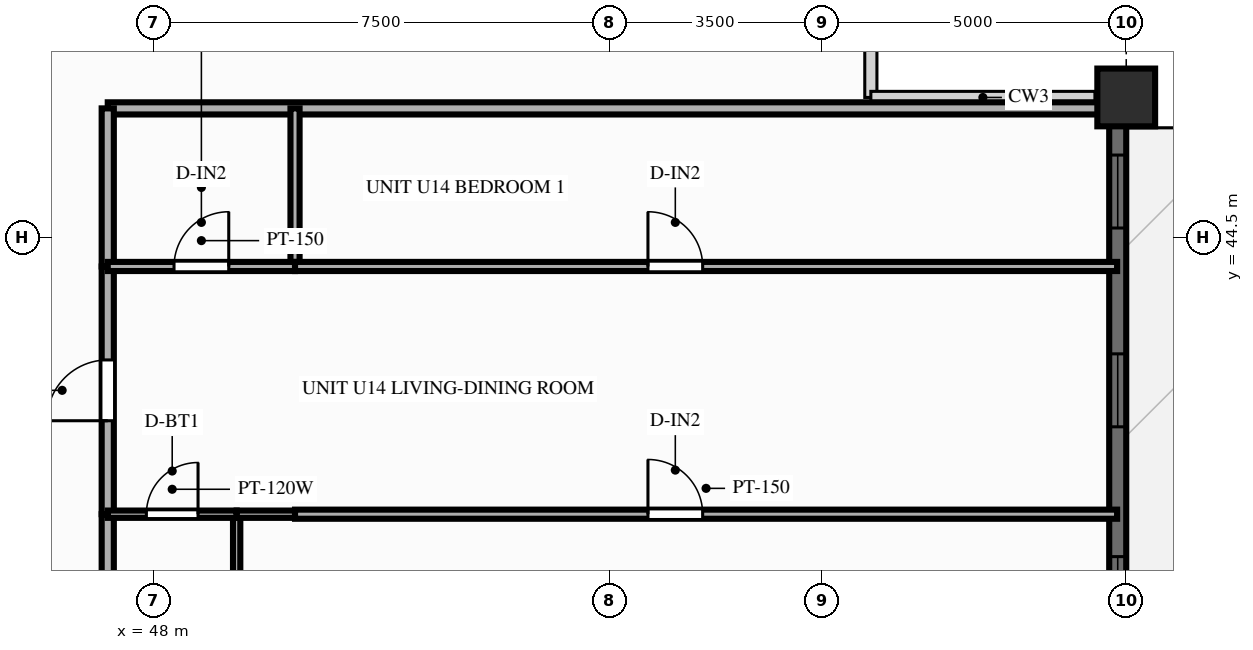
"""IFC4 building model, lengths in metres.
Left out: names, types, materials, properties, quantities, classifications, styles, units other than length and angle.
Written with IfcOpenShell. Run it as: python <this file> out.ifc"""

import sys

from ifc_helpers import new_model, si_unit, direction, frame, frame_2d, origin, origin_2d, place, context, subcontext, project, spatial, rectangle, extrude, source, transform, mapped, element, fill, save


model = new_model("IFC4")
c1 = context("Model", 3, precision=1e-05, world=origin(), true_north=direction((0.0, 1.0)))
c2 = subcontext(c1, "Body", "Model", "MODEL_VIEW")
j1 = project(units=[si_unit("LENGTHUNIT", "METRE"), si_unit("PLANEANGLEUNIT", "RADIAN")], contexts=[c1])
p1 = place(None, origin())
s1 = spatial("IfcSite", under=j1, at=p1, CompositionType="ELEMENT")
p2 = place(p1, origin())
s2 = spatial("IfcBuilding", under=s1, at=p2, CompositionType="ELEMENT")
p3 = place(p2, frame((0.0, 0.0, 116.85)))
s3 = spatial("IfcBuildingStorey", under=s2, at=p3, CompositionType="ELEMENT", Elevation=116.85)
m1 = source(origin(), c2, "Body", "SweptSolid", [
    extrude(rectangle(XDim=0.95, YDim=0.95, at=origin_2d()), origin(), (0.0, 0.0, 1.0), 3.0),
])
p4 = place(p3, frame((64.0, 46.8, 0.0), z_axis=(0.0, 0.0, 1.0), x_axis=(1.0, 0.0, 0.0)))
e1 = element("IfcColumn", 1, at=p4, inside=s3, PredefinedType="COLUMN", context=c2, shape_type="MappedRepresentation", body=[
    mapped(m1, transform((0.0, 0.0, 0.0), scale=1.0)),
])
p5 = place(p3, frame((63.86, 7.2, 0.0), z_axis=(0.0, 0.0, 1.0), x_axis=(0.0, 1.0, 0.0)))
e2 = element("IfcWall", 2, at=p5, inside=s3, PredefinedType="SOLIDWALL", context=c2, shape_type="SweptSolid", body=[
    extrude(rectangle(XDim=39.6, YDim=0.28, at=frame_2d((19.8, 0.0))), origin(), (0.0, 0.0, 1.0), 2.28),
])
p6 = place(p5, frame((1.56, 0.0, 0.25)))
e3 = element("IfcOpeningElement", 3, at=p6, cuts=e2, PredefinedType="OPENING", context=c2, shape_type="SweptSolid", body=[
    extrude(rectangle(XDim=1.2, YDim=1.5, at=frame_2d((0.6, 0.75))), frame((0.0, 0.152, 0.0), z_axis=(0.0, -1.0, 0.0), x_axis=(1.0, 0.0, 0.0)), (0.0, 0.0, 1.0), 0.304),
])
p7 = place(p5, frame((4.829, 0.0, 0.25)))
e4 = element("IfcOpeningElement", 4, at=p7, cuts=e2, PredefinedType="OPENING", context=c2, shape_type="SweptSolid", body=[
    extrude(rectangle(XDim=1.2, YDim=1.5, at=frame_2d((0.6, 0.75))), frame((0.0, 0.152, 0.0), z_axis=(0.0, -1.0, 0.0), x_axis=(1.0, 0.0, 0.0)), (0.0, 0.0, 1.0), 0.304),
])
p8 = place(p5, frame((7.567, 0.0, 0.25)))
e5 = element("IfcOpeningElement", 5, at=p8, cuts=e2, PredefinedType="OPENING", context=c2, shape_type="SweptSolid", body=[
    extrude(rectangle(XDim=1.2, YDim=1.5, at=frame_2d((0.6, 0.75))), frame((0.0, 0.152, 0.0), z_axis=(0.0, -1.0, 0.0), x_axis=(1.0, 0.0, 0.0)), (0.0, 0.0, 1.0), 0.304),
])
p9 = place(p5, frame((11.476, 0.0, 0.25)))
e6 = element("IfcOpeningElement", 6, at=p9, cuts=e2, PredefinedType="OPENING", context=c2, shape_type="SweptSolid", body=[
    extrude(rectangle(XDim=0.95, YDim=1.5, at=frame_2d((0.475, 0.75))), frame((0.0, 0.152, 0.0), z_axis=(0.0, -1.0, 0.0), x_axis=(1.0, 0.0, 0.0)), (0.0, 0.0, 1.0), 0.304),
])
p10 = place(p5, frame((13.552, 0.0, 0.25)))
e7 = element("IfcOpeningElement", 7, at=p10, cuts=e2, PredefinedType="OPENING", context=c2, shape_type="SweptSolid", body=[
    extrude(rectangle(XDim=1.2, YDim=1.5, at=frame_2d((0.6, 0.75))), frame((0.0, 0.152, 0.0), z_axis=(0.0, -1.0, 0.0), x_axis=(1.0, 0.0, 0.0)), (0.0, 0.0, 1.0), 0.304),
])
p11 = place(p5, frame((16.518, 0.0, 0.25)))
e8 = element("IfcOpeningElement", 8, at=p11, cuts=e2, PredefinedType="OPENING", context=c2, shape_type="SweptSolid", body=[
    extrude(rectangle(XDim=1.2, YDim=1.5, at=frame_2d((0.6, 0.75))), frame((0.0, 0.152, 0.0), z_axis=(0.0, -1.0, 0.0), x_axis=(1.0, 0.0, 0.0)), (0.0, 0.0, 1.0), 0.304),
])
p12 = place(p5, frame((19.2, 0.0, 0.25)))
e9 = element("IfcOpeningElement", 9, at=p12, cuts=e2, PredefinedType="OPENING", context=c2, shape_type="SweptSolid", body=[
    extrude(rectangle(XDim=1.2, YDim=1.5, at=frame_2d((0.6, 0.75))), frame((0.0, 0.152, 0.0), z_axis=(0.0, -1.0, 0.0), x_axis=(1.0, 0.0, 0.0)), (0.0, 0.0, 1.0), 0.304),
])
p13 = place(p5, frame((21.578, 0.0, 0.25)))
e10 = element("IfcOpeningElement", 10, at=p13, cuts=e2, PredefinedType="OPENING", context=c2, shape_type="SweptSolid", body=[
    extrude(rectangle(XDim=1.2, YDim=1.5, at=frame_2d((0.6, 0.75))), frame((0.0, 0.152, 0.0), z_axis=(0.0, -1.0, 0.0), x_axis=(1.0, 0.0, 0.0)), (0.0, 0.0, 1.0), 0.304),
])
p14 = place(p5, frame((26.313, 0.0, 0.0), z_axis=(0.0, 0.0, 1.0), x_axis=(-1.0, 0.0, 0.0)))
e11 = element("IfcOpeningElement", 11, at=p14, cuts=e2, PredefinedType="OPENING", context=c2, shape_type="SweptSolid", body=[
    extrude(rectangle(XDim=1.6, YDim=2.15, at=frame_2d((0.8, 1.075))), frame((0.0, 0.152, 0.0), z_axis=(0.0, -1.0, 0.0), x_axis=(1.0, 0.0, 0.0)), (0.0, 0.0, 1.0), 0.304),
])
p15 = place(p5, frame((29.305, 0.0, 0.25)))
e12 = element("IfcOpeningElement", 12, at=p15, cuts=e2, PredefinedType="OPENING", context=c2, shape_type="SweptSolid", body=[
    extrude(rectangle(XDim=0.7, YDim=1.5, at=frame_2d((0.35, 0.75))), frame((0.0, 0.152, 0.0), z_axis=(0.0, -1.0, 0.0), x_axis=(1.0, 0.0, 0.0)), (0.0, 0.0, 1.0), 0.304),
])
p16 = place(p5, frame((30.848, 0.0, 0.25)))
e13 = element("IfcOpeningElement", 13, at=p16, cuts=e2, PredefinedType="OPENING", context=c2, shape_type="SweptSolid", body=[
    extrude(rectangle(XDim=1.2, YDim=1.5, at=frame_2d((0.6, 0.75))), frame((0.0, 0.152, 0.0), z_axis=(0.0, -1.0, 0.0), x_axis=(1.0, 0.0, 0.0)), (0.0, 0.0, 1.0), 0.304),
])
p17 = place(p5, frame((34.183, 0.0, 0.25)))
e14 = element("IfcOpeningElement", 14, at=p17, cuts=e2, PredefinedType="OPENING", context=c2, shape_type="SweptSolid", body=[
    extrude(rectangle(XDim=1.2, YDim=1.5, at=frame_2d((0.6, 0.75))), frame((0.0, 0.152, 0.0), z_axis=(0.0, -1.0, 0.0), x_axis=(1.0, 0.0, 0.0)), (0.0, 0.0, 1.0), 0.304),
])
p18 = place(p5, frame((37.452, 0.0, 0.25)))
e15 = element("IfcOpeningElement", 15, at=p18, cuts=e2, PredefinedType="OPENING", context=c2, shape_type="SweptSolid", body=[
    extrude(rectangle(XDim=1.2, YDim=1.5, at=frame_2d((0.6, 0.75))), frame((0.0, 0.152, 0.0), z_axis=(0.0, -1.0, 0.0), x_axis=(1.0, 0.0, 0.0)), (0.0, 0.0, 1.0), 0.304),
])
p19 = place(p3, frame((47.25, 46.62, 0.0), z_axis=(0.0, 0.0, 1.0), x_axis=(1.0, 0.0, 0.0)))
e16 = element("IfcWall", 16, at=p19, inside=s3, PredefinedType="PARTITIONING", context=c2, shape_type="SweptSolid", body=[
    extrude(rectangle(XDim=16.6, YDim=0.2, at=frame_2d((8.3, 0.0))), origin(), (0.0, 0.0, 1.0), 2.79),
])
p20 = place(p3, frame((47.25, 37.35, 0.0), z_axis=(0.0, 0.0, 1.0), x_axis=(0.0, 1.0, 0.0)))
e17 = element("IfcWall", 17, at=p20, inside=s3, PredefinedType="PARTITIONING", context=c2, shape_type="SweptSolid", body=[
    extrude(rectangle(XDim=2.595, YDim=0.2, at=frame_2d((1.298, 0.0))), origin(), (0.0, 0.0, 1.0), 2.79),
])
p21 = place(p3, frame((47.25, 39.946, 0.0), z_axis=(0.0, 0.0, 1.0), x_axis=(0.0, 1.0, 0.0)))
e18 = element("IfcWall", 18, at=p21, inside=s3, PredefinedType="PARTITIONING", context=c2, shape_type="SweptSolid", body=[
    extrude(rectangle(XDim=4.074, YDim=0.2, at=frame_2d((2.037, 0.0))), origin(), (0.0, 0.0, 1.0), 2.79),
])
p22 = place(p21, frame((1.537, 0.0, 0.0)))
e19 = element("IfcOpeningElement", 19, at=p22, cuts=e18, PredefinedType="OPENING", context=c2, shape_type="SweptSolid", body=[
    extrude(rectangle(XDim=1.0, YDim=2.15, at=frame_2d((0.5, 1.075))), frame((0.0, 0.112, 0.0), z_axis=(0.0, -1.0, 0.0), x_axis=(1.0, 0.0, 0.0)), (0.0, 0.0, 1.0), 0.224),
])
p23 = place(p3, frame((47.25, 44.02, 0.0), z_axis=(0.0, 0.0, 1.0), x_axis=(0.0, 1.0, 0.0)))
e20 = element("IfcWall", 20, at=p23, inside=s3, PredefinedType="PARTITIONING", context=c2, shape_type="SweptSolid", body=[
    extrude(rectangle(XDim=2.6, YDim=0.2, at=frame_2d((1.3, 0.0))), origin(), (0.0, 0.0, 1.0), 2.79),
])
p24 = place(p3, frame((49.37, 37.35, 0.0), z_axis=(0.0, 0.0, 1.0), x_axis=(0.0, 1.0, 0.0)))
e21 = element("IfcWall", 21, at=p24, inside=s3, PredefinedType="PARTITIONING", context=c2, shape_type="SweptSolid", body=[
    extrude(rectangle(XDim=2.595, YDim=0.12, at=frame_2d((1.298, 0.0))), origin(), (0.0, 0.0, 1.0), 2.79),
])
p25 = place(p3, frame((50.33, 44.02, 0.0), z_axis=(0.0, 0.0, 1.0), x_axis=(0.0, 1.0, 0.0)))
e22 = element("IfcWall", 22, at=p25, inside=s3, PredefinedType="PARTITIONING", context=c2, shape_type="SweptSolid", body=[
    extrude(rectangle(XDim=2.6, YDim=0.15, at=frame_2d((1.3, 0.0))), origin(), (0.0, 0.0, 1.0), 2.79),
])
p26 = place(p3, frame((47.25, 39.946, 0.0), z_axis=(0.0, 0.0, 1.0), x_axis=(1.0, 0.0, 0.0)))
e23 = element("IfcWall", 23, at=p26, inside=s3, PredefinedType="PARTITIONING", context=c2, shape_type="SweptSolid", body=[
    extrude(rectangle(XDim=2.12, YDim=0.12, at=frame_2d((1.06, 0.0))), origin(), (0.0, 0.0, 1.0), 2.79),
])
p27 = place(p26, frame((0.635, 0.0, 0.0)))
e24 = element("IfcOpeningElement", 24, at=p27, cuts=e23, PredefinedType="OPENING", context=c2, shape_type="SweptSolid", body=[
    extrude(rectangle(XDim=0.85, YDim=2.05, at=frame_2d((0.425, 1.025))), frame((0.0, 0.072, 0.0), z_axis=(0.0, -1.0, 0.0), x_axis=(1.0, 0.0, 0.0)), (0.0, 0.0, 1.0), 0.144),
])
p28 = place(p3, frame((49.37, 39.946, 0.0), z_axis=(0.0, 0.0, 1.0), x_axis=(1.0, 0.0, 0.0)))
e25 = element("IfcWall", 25, at=p28, inside=s3, PredefinedType="PARTITIONING", context=c2, shape_type="SweptSolid", body=[
    extrude(rectangle(XDim=0.96, YDim=0.12, at=frame_2d((0.48, 0.0))), origin(), (0.0, 0.0, 1.0), 2.79),
])
p29 = place(p3, frame((50.33, 39.946, 0.0), z_axis=(0.0, 0.0, 1.0), x_axis=(1.0, 0.0, 0.0)))
e26 = element("IfcWall", 26, at=p29, inside=s3, PredefinedType="PARTITIONING", context=c2, shape_type="SweptSolid", body=[
    extrude(rectangle(XDim=13.52, YDim=0.15, at=frame_2d((6.76, 0.0))), origin(), (0.0, 0.0, 1.0), 2.79),
])
p30 = place(p29, frame((5.804, 0.0, 0.0)))
e27 = element("IfcOpeningElement", 27, at=p30, cuts=e26, PredefinedType="OPENING", context=c2, shape_type="SweptSolid", body=[
    extrude(rectangle(XDim=0.9, YDim=2.1, at=frame_2d((0.45, 1.05))), frame((0.0, 0.087, 0.0), z_axis=(0.0, -1.0, 0.0), x_axis=(1.0, 0.0, 0.0)), (0.0, 0.0, 1.0), 0.174),
])
p31 = place(p3, frame((47.25, 44.02, 0.0), z_axis=(0.0, 0.0, 1.0), x_axis=(1.0, 0.0, 0.0)))
e28 = element("IfcWall", 28, at=p31, inside=s3, PredefinedType="PARTITIONING", context=c2, shape_type="SweptSolid", body=[
    extrude(rectangle(XDim=3.08, YDim=0.15, at=frame_2d((1.54, 0.0))), origin(), (0.0, 0.0, 1.0), 2.79),
])
p32 = place(p31, frame((1.09, 0.0, 0.0)))
e29 = element("IfcOpeningElement", 29, at=p32, cuts=e28, PredefinedType="OPENING", context=c2, shape_type="SweptSolid", body=[
    extrude(rectangle(XDim=0.9, YDim=2.1, at=frame_2d((0.45, 1.05))), frame((0.0, 0.087, 0.0), z_axis=(0.0, -1.0, 0.0), x_axis=(1.0, 0.0, 0.0)), (0.0, 0.0, 1.0), 0.174),
])
p33 = place(p3, frame((50.33, 44.02, 0.0), z_axis=(0.0, 0.0, 1.0), x_axis=(1.0, 0.0, 0.0)))
e30 = element("IfcWall", 30, at=p33, inside=s3, PredefinedType="PARTITIONING", context=c2, shape_type="SweptSolid", body=[
    extrude(rectangle(XDim=13.52, YDim=0.15, at=frame_2d((6.76, 0.0))), origin(), (0.0, 0.0, 1.0), 2.79),
])
p34 = place(p33, frame((5.804, 0.0, 0.0)))
e31 = element("IfcOpeningElement", 31, at=p34, cuts=e30, PredefinedType="OPENING", context=c2, shape_type="SweptSolid", body=[
    extrude(rectangle(XDim=0.9, YDim=2.1, at=frame_2d((0.45, 1.05))), frame((0.0, 0.087, 0.0), z_axis=(0.0, -1.0, 0.0), x_axis=(1.0, 0.0, 0.0)), (0.0, 0.0, 1.0), 0.174),
])
m2 = source(origin(), c2, "Body", "SweptSolid", [
    extrude(rectangle(XDim=1.2, YDim=1.5, at=frame_2d((0.6, 0.75))), frame((0.0, 0.03, 0.0), z_axis=(0.0, -1.0, 0.0), x_axis=(1.0, 0.0, 0.0)), (0.0, 0.0, 1.0), 0.06),
])
p35 = place(p16, origin())
e32 = element("IfcWindow", 32, at=p35, inside=s3, PartitioningType="SINGLE_PANEL", PredefinedType="WINDOW", context=c2, shape_type="MappedRepresentation", body=[
    mapped(m2, transform((0.0, 0.0, 0.0), scale=1.0)),
])
fill(e13, e32)
p36 = place(p17, origin())
e33 = element("IfcWindow", 33, at=p36, inside=s3, PartitioningType="SINGLE_PANEL", PredefinedType="WINDOW", context=c2, shape_type="MappedRepresentation", body=[
    mapped(m2, transform((0.0, 0.0, 0.0), scale=1.0)),
])
fill(e14, e33)
p37 = place(p18, origin())
e34 = element("IfcWindow", 34, at=p37, inside=s3, PartitioningType="SINGLE_PANEL", PredefinedType="WINDOW", context=c2, shape_type="MappedRepresentation", body=[
    mapped(m2, transform((0.0, 0.0, 0.0), scale=1.0)),
])
fill(e15, e34)
m3 = source(origin(), c2, "Body", "SweptSolid", [
    extrude(rectangle(XDim=1.0, YDim=2.15, at=frame_2d((0.5, 1.075))), frame((0.0, 0.025, 0.0), z_axis=(0.0, -1.0, 0.0), x_axis=(1.0, 0.0, 0.0)), (0.0, 0.0, 1.0), 0.05),
])
p38 = place(p22, origin())
e35 = element("IfcDoor", 35, at=p38, inside=s3, OperationType="SINGLE_SWING_LEFT", PredefinedType="DOOR", context=c2, shape_type="MappedRepresentation", body=[
    mapped(m3, transform((0.0, 0.0, 0.0), scale=1.0)),
])
fill(e19, e35)
m4 = source(origin(), c2, "Body", "SweptSolid", [
    extrude(rectangle(XDim=0.85, YDim=2.05, at=frame_2d((0.425, 1.025))), frame((0.0, 0.025, 0.0), z_axis=(0.0, -1.0, 0.0), x_axis=(1.0, 0.0, 0.0)), (0.0, 0.0, 1.0), 0.05),
])
p39 = place(p27, origin())
e36 = element("IfcDoor", 36, at=p39, inside=s3, OperationType="SINGLE_SWING_RIGHT", PredefinedType="DOOR", context=c2, shape_type="MappedRepresentation", body=[
    mapped(m4, transform((0.0, 0.0, 0.0), scale=1.0)),
])
fill(e24, e36)
m5 = source(origin(), c2, "Body", "SweptSolid", [
    extrude(rectangle(XDim=0.9, YDim=2.1, at=frame_2d((0.45, 1.05))), frame((0.0, 0.025, 0.0), z_axis=(0.0, -1.0, 0.0), x_axis=(1.0, 0.0, 0.0)), (0.0, 0.0, 1.0), 0.05),
])
p40 = place(p30, origin())
e37 = element("IfcDoor", 37, at=p40, inside=s3, OperationType="SINGLE_SWING_LEFT", PredefinedType="DOOR", context=c2, shape_type="MappedRepresentation", body=[
    mapped(m5, transform((0.0, 0.0, 0.0), scale=1.0)),
])
fill(e27, e37)
p41 = place(p32, origin())
e38 = element("IfcDoor", 38, at=p41, inside=s3, OperationType="SINGLE_SWING_RIGHT", PredefinedType="DOOR", context=c2, shape_type="MappedRepresentation", body=[
    mapped(m5, transform((0.0, 0.0, 0.0), scale=1.0)),
])
fill(e29, e38)
p42 = place(p34, origin())
e39 = element("IfcDoor", 39, at=p42, inside=s3, OperationType="SINGLE_SWING_LEFT", PredefinedType="DOOR", context=c2, shape_type="MappedRepresentation", body=[
    mapped(m5, transform((0.0, 0.0, 0.0), scale=1.0)),
])
fill(e31, e39)
save(model, sys.argv[1])
